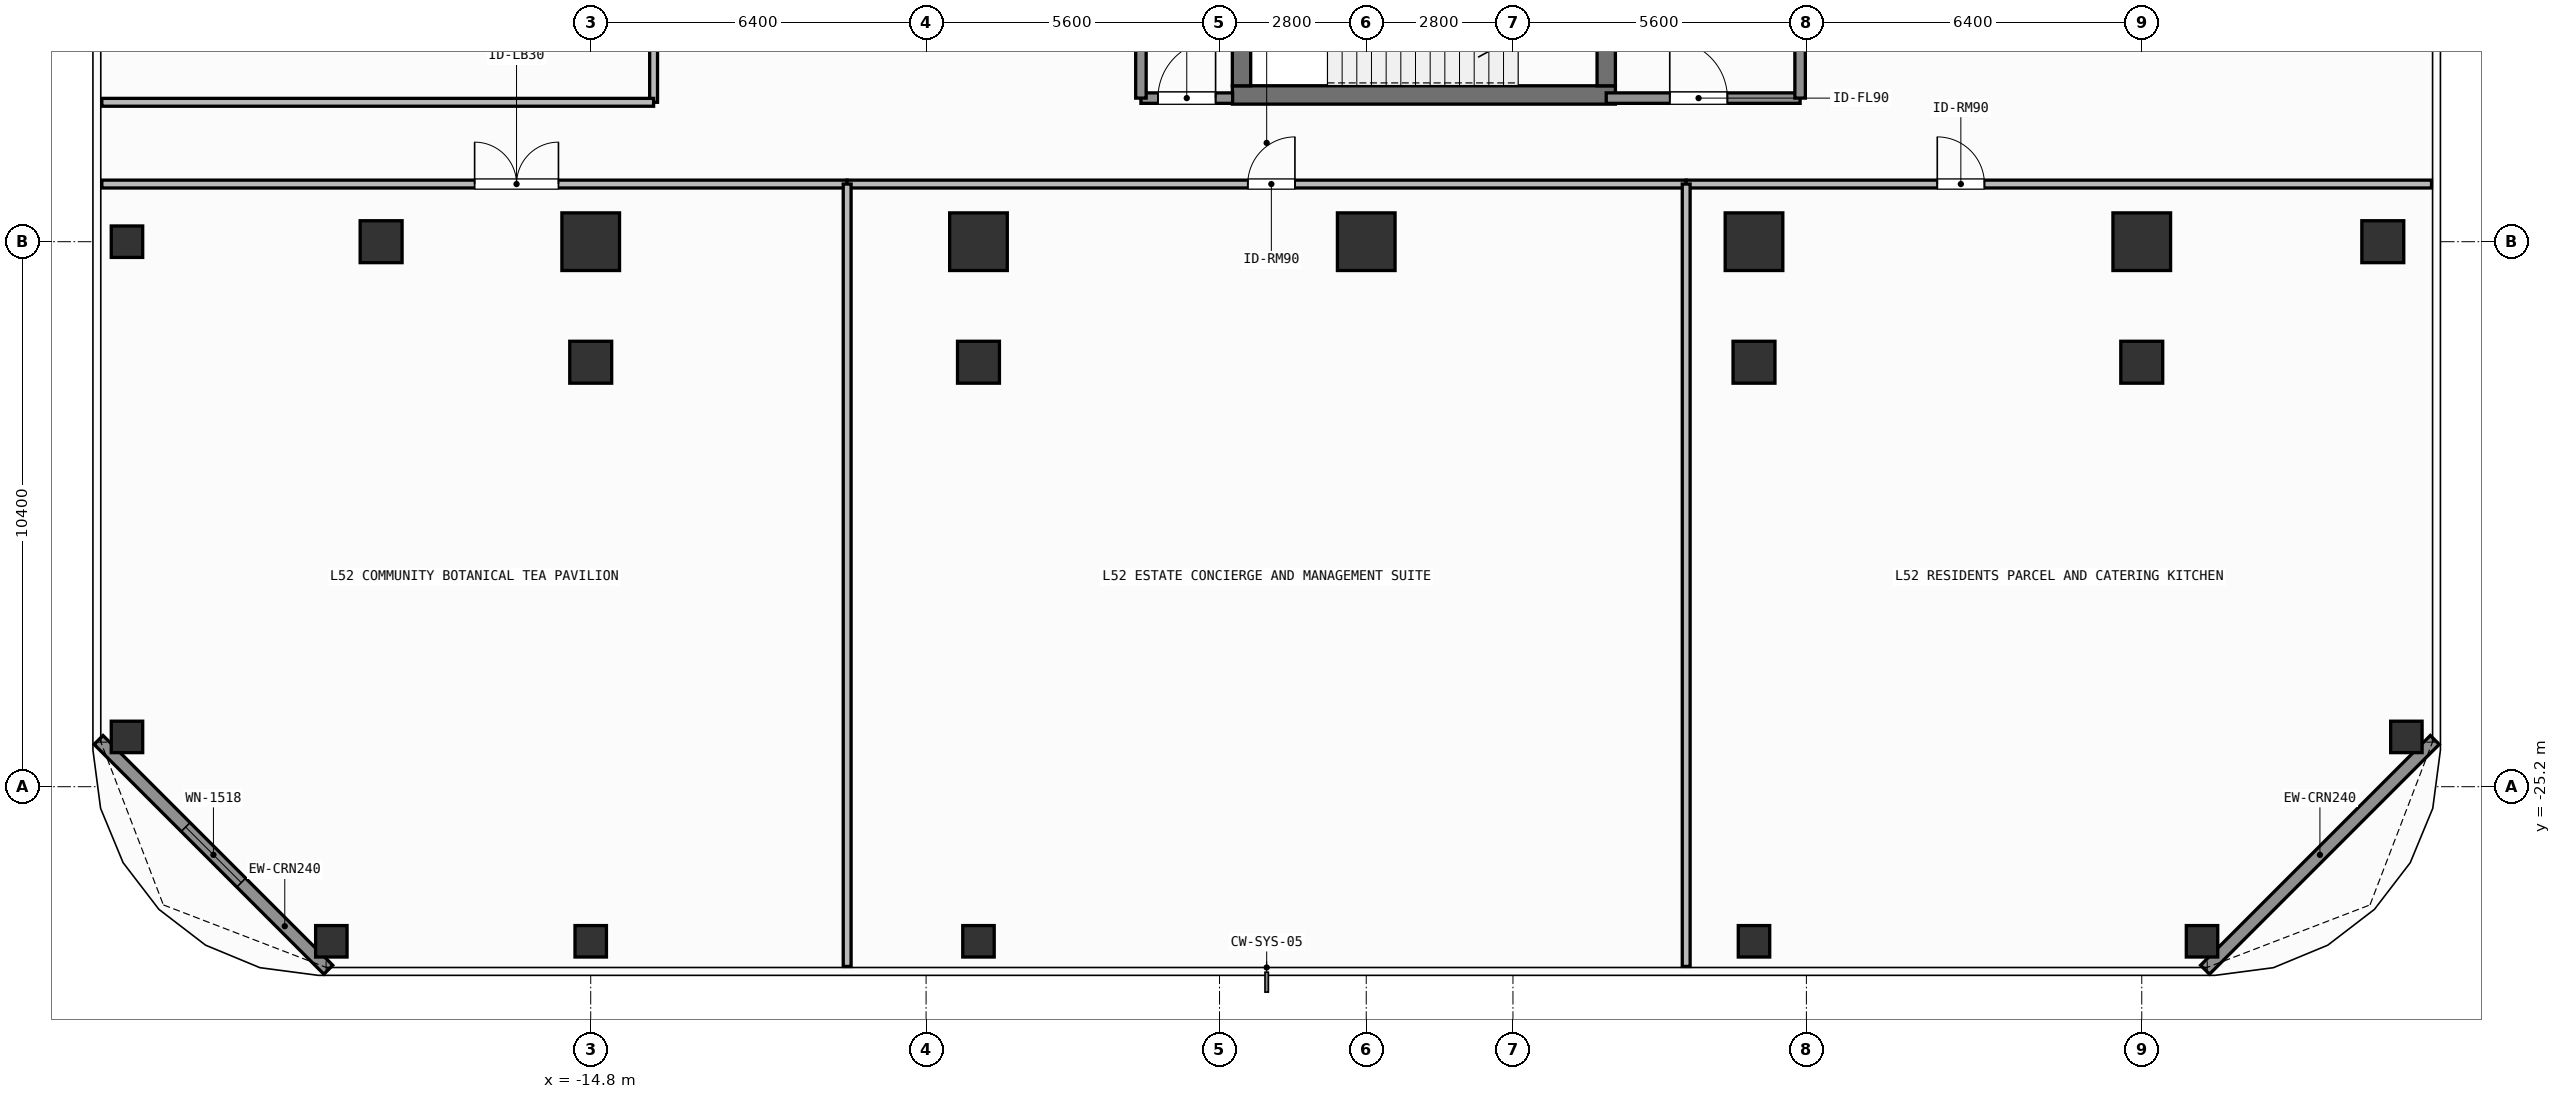
"""IFC4 building model, lengths in metres.
Left out: names, types, materials, properties, quantities, classifications, styles, units other than length and angle.
Written with IfcOpenShell. Run it as: python <this file> out.ifc"""

import sys

from ifc_helpers import new_model, si_unit, direction, frame, frame_2d, origin, origin_2d, place, context, subcontext, project, spatial, rectangle, hollow_rectangle, extrude, element, fill, save


model = new_model("IFC4")
c1 = context("Model", 3, precision=1e-05, world=origin(), true_north=direction((0.0, 1.0)))
c2 = subcontext(c1, "Body", "Model", "MODEL_VIEW")
j1 = project(units=[si_unit("LENGTHUNIT", "METRE"), si_unit("PLANEANGLEUNIT", "RADIAN")], contexts=[c1])
p1 = place(None, origin())
s1 = spatial("IfcSite", under=j1, at=p1, CompositionType="ELEMENT")
p2 = place(p1, origin())
s2 = spatial("IfcBuilding", under=s1, at=p2, CompositionType="ELEMENT")
p3 = place(p2, frame((0.0, 0.0, 210.9)))
s3 = spatial("IfcBuildingStorey", under=s2, at=p3, CompositionType="ELEMENT", Elevation=210.9)
p4 = place(p3, frame((-2.555, -12.0, 0.0), z_axis=(0.0, 0.0, 1.0), x_axis=(1.0, 0.0, 0.0)))
e1 = element("IfcWall", 1, at=p4, inside=s3, PredefinedType="SHEAR", context=c2, shape_type="SweptSolid", body=[
    extrude(rectangle(XDim=7.31, YDim=0.35, at=frame_2d((3.655, 0.0))), origin(), (0.0, 0.0, 1.0), 4.8),
])
p5 = place(p3, frame((-2.38, -11.825, 0.0), z_axis=(0.0, 0.0, 1.0), x_axis=(0.0, 1.0, 0.0)))
e2 = element("IfcWall", 2, at=p5, inside=s3, PredefinedType="SHEAR", context=c2, shape_type="SweptSolid", body=[
    extrude(rectangle(XDim=2.925, YDim=0.35, at=frame_2d((1.462, 0.0))), origin(), (0.0, 0.0, 1.0), 4.8),
])
p6 = place(p3, frame((4.58, -8.9, 0.0), z_axis=(0.0, 0.0, 1.0), x_axis=(0.0, -1.0, 0.0)))
e3 = element("IfcWall", 3, at=p6, inside=s3, PredefinedType="SHEAR", context=c2, shape_type="SweptSolid", body=[
    extrude(rectangle(XDim=2.925, YDim=0.35, at=frame_2d((1.462, 0.0))), origin(), (0.0, 0.0, 1.0), 4.8),
])
p7 = place(p6, frame((0.913, 0.0, 0.0)))
e4 = element("IfcOpeningElement", 4, at=p7, cuts=e3, PredefinedType="OPENING", context=c2, shape_type="SweptSolid", body=[
    extrude(rectangle(XDim=1.1, YDim=2.15, at=frame_2d((0.55, 1.075))), frame((0.0, 0.185, 0.0), z_axis=(0.0, -1.0, 0.0), x_axis=(1.0, 0.0, 0.0)), (0.0, 0.0, 1.0), 0.37),
])
for number, where, z_axis, x_axis in (
    (5, (-14.8, -14.8, 0.0), (0.0, 0.0, 1.0), (1.0, 0.0, 0.0)),
    (6, (-7.4, -14.8, 0.0), (0.0, 0.0, 1.0), (1.0, 0.0, 0.0)),
    (7, (0.0, -14.8, 0.0), (0.0, 0.0, 1.0), (1.0, 0.0, 0.0)),
    (8, (7.4, -14.8, 0.0), (0.0, 0.0, 1.0), (1.0, 0.0, 0.0)),
    (9, (14.8, -14.8, 0.0), (0.0, 0.0, 1.0), (1.0, 0.0, 0.0)),
):
    element("IfcColumn", number, at=place(p3, frame(where, z_axis=z_axis, x_axis=x_axis)), inside=s3, PredefinedType="COLUMN", context=c2, shape_type="SweptSolid", body=[
        extrude(rectangle(XDim=1.1, YDim=1.1, at=origin_2d()), origin(), (0.0, 0.0, 1.0), 4.8),
    ])
for number, where, z_axis, x_axis in (
    (10, (-18.8, -14.8, 0.0), (0.0, 0.0, 1.0), (1.0, 0.0, 0.0)),
    (11, (19.4, -14.8, 0.0), (0.0, 0.0, 1.0), (1.0, 0.0, 0.0)),
    (12, (-14.8, -17.1, 0.0), (0.0, 0.0, 1.0), (1.0, 0.0, 0.0)),
    (13, (-7.4, -17.1, 0.0), (0.0, 0.0, 1.0), (1.0, 0.0, 0.0)),
    (14, (7.4, -17.1, 0.0), (0.0, 0.0, 1.0), (1.0, 0.0, 0.0)),
    (15, (14.8, -17.1, 0.0), (0.0, 0.0, 1.0), (1.0, 0.0, 0.0)),
):
    element("IfcColumn", number, at=place(p3, frame(where, z_axis=z_axis, x_axis=x_axis)), inside=s3, PredefinedType="COLUMN", context=c2, shape_type="SweptSolid", body=[
        extrude(hollow_rectangle(XDim=0.8, YDim=0.8, WallThickness=0.036, at=origin_2d()), origin(), (0.0, 0.0, 1.0), 4.8),
    ])
for number, where, z_axis, x_axis in (
    (16, (-19.75, -28.15, 0.0), (0.0, 0.0, 1.0), (1.0, 0.0, 0.0)),
    (17, (15.95, -28.15, 0.0), (0.0, 0.0, 1.0), (1.0, 0.0, 0.0)),
    (18, (-23.65, -24.25, 0.0), (0.0, 0.0, 1.0), (1.0, 0.0, 0.0)),
    (19, (19.85, -24.25, 0.0), (0.0, 0.0, 1.0), (1.0, 0.0, 0.0)),
    (20, (-14.8, -28.15, 0.0), (0.0, 0.0, 1.0), (1.0, 0.0, 0.0)),
    (21, (-7.4, -28.15, 0.0), (0.0, 0.0, 1.0), (1.0, 0.0, 0.0)),
    (22, (7.4, -28.15, 0.0), (0.0, 0.0, 1.0), (1.0, 0.0, 0.0)),
    (23, (-23.65, -14.8, 0.0), (0.0, 0.0, 1.0), (1.0, 0.0, 0.0)),
):
    element("IfcColumn", number, at=place(p3, frame(where, z_axis=z_axis, x_axis=x_axis)), inside=s3, PredefinedType="COLUMN", context=c2, shape_type="SweptSolid", body=[
        extrude(hollow_rectangle(XDim=0.6, YDim=0.6, WallThickness=0.028, at=origin_2d()), origin(), (0.0, 0.0, 1.0), 4.8),
    ])
p8 = place(p3, frame((-19.808, -28.692, 0.0), z_axis=(0.0, 0.0, 1.0), x_axis=(-0.707106781187, 0.707106781187, 0.0)))
e24 = element("IfcWall", 24, at=p8, inside=s3, PredefinedType="SOLIDWALL", context=c2, shape_type="SweptSolid", body=[
    extrude(rectangle(XDim=6.201, YDim=0.24, at=frame_2d((3.101, 0.0))), origin(), (0.0, 0.0, 1.0), 4.58),
])
p9 = place(p8, frame((2.351, 0.0, 0.8)))
e25 = element("IfcOpeningElement", 25, at=p9, cuts=e24, PredefinedType="OPENING", context=c2, shape_type="SweptSolid", body=[
    extrude(rectangle(XDim=1.5, YDim=1.85, at=frame_2d((0.75, 0.925))), frame((0.0, 0.13, 0.0), z_axis=(0.0, -1.0, 0.0), x_axis=(1.0, 0.0, 0.0)), (0.0, 0.0, 1.0), 0.26),
])
p10 = place(p3, frame((20.392, -24.308, 0.0), z_axis=(0.0, 0.0, 1.0), x_axis=(-0.707106781187, -0.707106781187, 0.0)))
e26 = element("IfcWall", 26, at=p10, inside=s3, PredefinedType="SOLIDWALL", context=c2, shape_type="SweptSolid", body=[
    extrude(rectangle(XDim=6.201, YDim=0.24, at=frame_2d((3.101, 0.0))), origin(), (0.0, 0.0, 1.0), 4.58),
])
p11 = place(p3, frame((4.58, -12.06, 0.0), z_axis=(0.0, 0.0, 1.0), x_axis=(1.0, 0.0, 0.0)))
e27 = element("IfcWall", 27, at=p11, inside=s3, PredefinedType="SOLIDWALL", context=c2, shape_type="SweptSolid", body=[
    extrude(rectangle(XDim=3.7, YDim=0.2, at=frame_2d((1.85, 0.0))), origin(), (0.0, 0.0, 1.0), 4.58),
])
p12 = place(p11, frame((1.212, 0.0, 0.0)))
e28 = element("IfcOpeningElement", 28, at=p12, cuts=e27, PredefinedType="OPENING", context=c2, shape_type="SweptSolid", body=[
    extrude(rectangle(XDim=1.1, YDim=2.15, at=frame_2d((0.55, 1.075))), frame((0.0, 0.11, 0.0), z_axis=(0.0, -1.0, 0.0), x_axis=(1.0, 0.0, 0.0)), (0.0, 0.0, 1.0), 0.22),
])
p13 = place(p3, frame((-4.3, -12.06, 0.0), z_axis=(0.0, 0.0, 1.0), x_axis=(1.0, 0.0, 0.0)))
e29 = element("IfcWall", 29, at=p13, inside=s3, PredefinedType="SOLIDWALL", context=c2, shape_type="SweptSolid", body=[
    extrude(rectangle(XDim=1.75, YDim=0.2, at=frame_2d((0.875, 0.0))), origin(), (0.0, 0.0, 1.0), 4.58),
])
p14 = place(p13, frame((0.325, 0.0, 0.0)))
e30 = element("IfcOpeningElement", 30, at=p14, cuts=e29, PredefinedType="OPENING", context=c2, shape_type="SweptSolid", body=[
    extrude(rectangle(XDim=1.1, YDim=2.15, at=frame_2d((0.55, 1.075))), frame((0.0, 0.11, 0.0), z_axis=(0.0, -1.0, 0.0), x_axis=(1.0, 0.0, 0.0)), (0.0, 0.0, 1.0), 0.22),
])
p15 = place(p3, frame((-24.13, -13.7, 0.0), z_axis=(0.0, 0.0, 1.0), x_axis=(1.0, 0.0, 0.0)))
e31 = element("IfcWall", 31, at=p15, inside=s3, PredefinedType="PARTITIONING", context=c2, shape_type="SweptSolid", body=[
    extrude(rectangle(XDim=14.224, YDim=0.15, at=frame_2d((7.112, 0.0))), origin(), (0.0, 0.0, 1.0), 4.58),
])
p16 = place(p15, frame((7.115, 0.0, 0.0)))
e32 = element("IfcOpeningElement", 32, at=p16, cuts=e31, PredefinedType="OPENING", context=c2, shape_type="SweptSolid", body=[
    extrude(rectangle(XDim=1.6, YDim=2.3, at=frame_2d((0.8, 1.15))), frame((0.0, 0.085, 0.0), z_axis=(0.0, -1.0, 0.0), x_axis=(1.0, 0.0, 0.0)), (0.0, 0.0, 1.0), 0.17),
])
p17 = place(p3, frame((-9.906, -13.7, 0.0), z_axis=(0.0, 0.0, 1.0), x_axis=(1.0, 0.0, 0.0)))
e33 = element("IfcWall", 33, at=p17, inside=s3, PredefinedType="PARTITIONING", context=c2, shape_type="SweptSolid", body=[
    extrude(rectangle(XDim=16.012, YDim=0.15, at=frame_2d((8.006, 0.0))), origin(), (0.0, 0.0, 1.0), 4.58),
])
p18 = place(p17, frame((7.645, 0.0, 0.0)))
e34 = element("IfcOpeningElement", 34, at=p18, cuts=e33, PredefinedType="OPENING", context=c2, shape_type="SweptSolid", body=[
    extrude(rectangle(XDim=0.9, YDim=2.1, at=frame_2d((0.45, 1.05))), frame((0.0, 0.085, 0.0), z_axis=(0.0, -1.0, 0.0), x_axis=(1.0, 0.0, 0.0)), (0.0, 0.0, 1.0), 0.17),
])
p19 = place(p3, frame((6.106, -13.7, 0.0), z_axis=(0.0, 0.0, 1.0), x_axis=(1.0, 0.0, 0.0)))
e35 = element("IfcWall", 35, at=p19, inside=s3, PredefinedType="PARTITIONING", context=c2, shape_type="SweptSolid", body=[
    extrude(rectangle(XDim=14.224, YDim=0.15, at=frame_2d((7.112, 0.0))), origin(), (0.0, 0.0, 1.0), 4.58),
])
p20 = place(p19, frame((4.792, 0.0, 0.0)))
e36 = element("IfcOpeningElement", 36, at=p20, cuts=e35, PredefinedType="OPENING", context=c2, shape_type="SweptSolid", body=[
    extrude(rectangle(XDim=0.9, YDim=2.1, at=frame_2d((0.45, 1.05))), frame((0.0, 0.085, 0.0), z_axis=(0.0, -1.0, 0.0), x_axis=(1.0, 0.0, 0.0)), (0.0, 0.0, 1.0), 0.17),
])
p21 = place(p3, frame((-13.6, -12.14, 0.0), z_axis=(0.0, 0.0, 1.0), x_axis=(0.0, 1.0, 0.0)))
e37 = element("IfcWall", 37, at=p21, inside=s3, PredefinedType="PARTITIONING", context=c2, shape_type="SweptSolid", body=[
    extrude(rectangle(XDim=24.28, YDim=0.15, at=frame_2d((12.14, 0.0))), origin(), (0.0, 0.0, 1.0), 4.58),
])
p22 = place(p21, frame((11.25, 0.0, 0.0)))
e38 = element("IfcOpeningElement", 38, at=p22, cuts=e37, PredefinedType="OPENING", context=c2, shape_type="SweptSolid", body=[
    extrude(rectangle(XDim=1.6, YDim=2.3, at=frame_2d((0.8, 1.15))), frame((0.0, 0.085, 0.0), z_axis=(0.0, -1.0, 0.0), x_axis=(1.0, 0.0, 0.0)), (0.0, 0.0, 1.0), 0.17),
])
for number, where, z_axis, x_axis in (
    (39, (8.28, -12.06, 0.0), (0.0, 0.0, 1.0), (0.0, 1.0, 0.0)),
    (40, (-4.3, -12.06, 0.0), (0.0, 0.0, 1.0), (0.0, 1.0, 0.0)),
):
    element("IfcWall", number, at=place(p3, frame(where, z_axis=z_axis, x_axis=x_axis)), inside=s3, PredefinedType="SOLIDWALL", context=c2, shape_type="SweptSolid", body=[
        extrude(rectangle(XDim=3.26, YDim=0.2, at=frame_2d((1.63, 0.0))), origin(), (0.0, 0.0, 1.0), 4.58),
    ])
for number, where, z_axis, x_axis in (
    (41, (-9.906, -28.63, 0.0), (0.0, 0.0, 1.0), (0.0, 1.0, 0.0)),
    (42, (6.106, -28.63, 0.0), (0.0, 0.0, 1.0), (0.0, 1.0, 0.0)),
):
    element("IfcWall", number, at=place(p3, frame(where, z_axis=z_axis, x_axis=x_axis)), inside=s3, PredefinedType="PARTITIONING", context=c2, shape_type="SweptSolid", body=[
        extrude(rectangle(XDim=14.93, YDim=0.15, at=frame_2d((7.465, 0.0))), origin(), (0.0, 0.0, 1.0), 4.58),
    ])
p23 = place(p3, frame((-24.13, -12.14, 0.0), z_axis=(0.0, 0.0, 1.0), x_axis=(1.0, 0.0, 0.0)))
e43 = element("IfcWall", 43, at=p23, inside=s3, PredefinedType="PARTITIONING", context=c2, shape_type="SweptSolid", body=[
    extrude(rectangle(XDim=10.53, YDim=0.15, at=frame_2d((5.265, 0.0))), origin(), (0.0, 0.0, 1.0), 4.58),
])
p24 = place(p9, origin())
e44 = element("IfcWindow", 44, at=p24, inside=s3, PartitioningType="SINGLE_PANEL", PredefinedType="WINDOW", context=c2, shape_type="SweptSolid", body=[
    extrude(rectangle(XDim=1.5, YDim=1.85, at=frame_2d((0.75, 0.925))), frame((0.0, 0.03, 0.0), z_axis=(0.0, -1.0, 0.0), x_axis=(1.0, 0.0, 0.0)), (0.0, 0.0, 1.0), 0.06),
])
fill(e25, e44)
p25 = place(p12, origin())
e45 = element("IfcDoor", 45, at=p25, inside=s3, OperationType="SINGLE_SWING_LEFT", PredefinedType="DOOR", context=c2, shape_type="SweptSolid", body=[
    extrude(rectangle(XDim=1.1, YDim=2.15, at=frame_2d((0.55, 1.075))), frame((0.0, 0.025, 0.0), z_axis=(0.0, -1.0, 0.0), x_axis=(1.0, 0.0, 0.0)), (0.0, 0.0, 1.0), 0.05),
])
fill(e28, e45)
p26 = place(p14, origin())
e46 = element("IfcDoor", 46, at=p26, inside=s3, OperationType="SINGLE_SWING_RIGHT", PredefinedType="DOOR", context=c2, shape_type="SweptSolid", body=[
    extrude(rectangle(XDim=1.1, YDim=2.15, at=frame_2d((0.55, 1.075))), frame((0.0, 0.025, 0.0), z_axis=(0.0, -1.0, 0.0), x_axis=(1.0, 0.0, 0.0)), (0.0, 0.0, 1.0), 0.05),
])
fill(e30, e46)
p27 = place(p16, origin())
e47 = element("IfcDoor", 47, at=p27, inside=s3, OperationType="SINGLE_SWING_LEFT", PredefinedType="DOOR", context=c2, shape_type="SweptSolid", body=[
    extrude(rectangle(XDim=1.6, YDim=2.3, at=frame_2d((0.8, 1.15))), frame((0.0, 0.025, 0.0), z_axis=(0.0, -1.0, 0.0), x_axis=(1.0, 0.0, 0.0)), (0.0, 0.0, 1.0), 0.05),
])
fill(e32, e47)
p28 = place(p18, origin())
e48 = element("IfcDoor", 48, at=p28, inside=s3, OperationType="SINGLE_SWING_RIGHT", PredefinedType="DOOR", context=c2, shape_type="SweptSolid", body=[
    extrude(rectangle(XDim=0.9, YDim=2.1, at=frame_2d((0.45, 1.05))), frame((0.0, 0.025, 0.0), z_axis=(0.0, -1.0, 0.0), x_axis=(1.0, 0.0, 0.0)), (0.0, 0.0, 1.0), 0.05),
])
fill(e34, e48)
p29 = place(p20, origin())
e49 = element("IfcDoor", 49, at=p29, inside=s3, OperationType="SINGLE_SWING_LEFT", PredefinedType="DOOR", context=c2, shape_type="SweptSolid", body=[
    extrude(rectangle(XDim=0.9, YDim=2.1, at=frame_2d((0.45, 1.05))), frame((0.0, 0.025, 0.0), z_axis=(0.0, -1.0, 0.0), x_axis=(1.0, 0.0, 0.0)), (0.0, 0.0, 1.0), 0.05),
])
fill(e36, e49)
save(model, sys.argv[1])
